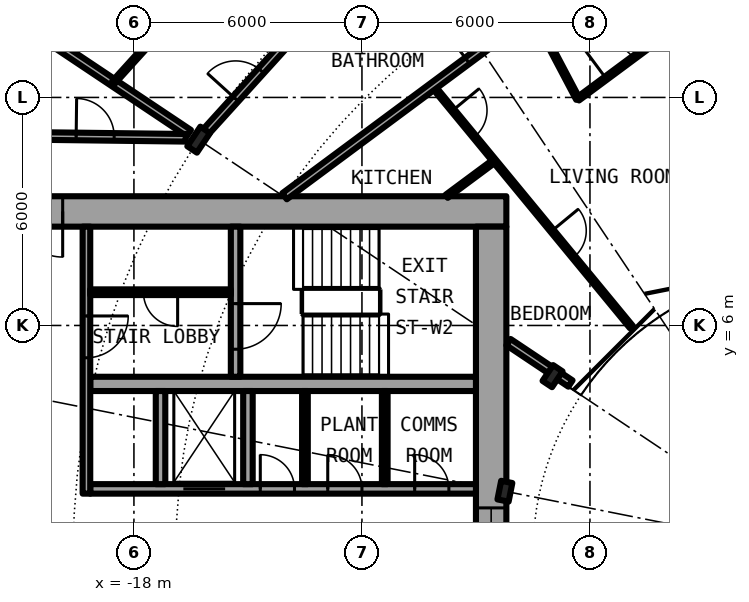
"""IFC4 building model, lengths in metres.
Left out: names, types, materials, properties, quantities, classifications, styles, units other than length and angle.
Written with IfcOpenShell. Run it as: python <this file> out.ifc"""

import sys

from ifc_helpers import new_model, si_unit, direction, frame, frame_2d, origin, origin_2d, place, context, subcontext, project, spatial, rectangle, i_section, extrude, element, fill, save


model = new_model("IFC4")
c1 = context("Model", 3, precision=1e-05, world=origin(), true_north=direction((0.0, 1.0)))
c2 = subcontext(c1, "Body", "Model", "MODEL_VIEW")
j1 = project(units=[si_unit("LENGTHUNIT", "METRE"), si_unit("PLANEANGLEUNIT", "RADIAN")], contexts=[c1])
p1 = place(None, origin())
s1 = spatial("IfcSite", under=j1, at=p1, CompositionType="ELEMENT")
p2 = place(p1, origin())
s2 = spatial("IfcBuilding", under=s1, at=p2, CompositionType="ELEMENT")
p3 = place(p2, frame((0.0, 0.0, 50.25)))
s3 = spatial("IfcBuildingStorey", under=s2, at=p3, CompositionType="ELEMENT", Elevation=50.25)
p4 = place(p3, frame((-16.297, 10.889, 0.0), z_axis=(0.0, 0.0, 1.0), x_axis=(-0.831469612303, 0.55557023302, 0.0)))
e1 = element("IfcColumn", 1, at=p4, inside=s3, PredefinedType="COLUMN", context=c2, shape_type="SweptSolid", body=[
    extrude(i_section(OverallWidth=0.305, OverallDepth=0.62, WebThickness=0.021, FlangeThickness=0.04, FilletRadius=0.027, at=origin_2d()), origin(), (0.0, 0.0, 1.0), 3.05),
])
for number, where, z_axis, x_axis in (
    (2, (-6.984, 4.667, 0.0), (0.0, 0.0, 1.0), (-0.831, 0.556, 0.0)),
    (3, (-8.239, 1.639, 0.0), (0.0, 0.0, 1.0), (-0.981, 0.195, 0.0)),
):
    element("IfcColumn", number, at=place(p3, frame(where, z_axis=z_axis, x_axis=x_axis)), inside=s3, PredefinedType="COLUMN", context=c2, shape_type="SweptSolid", body=[
        extrude(i_section(OverallWidth=0.3, OverallDepth=0.5, WebThickness=0.014, FlangeThickness=0.028, FilletRadius=0.027, at=origin_2d()), origin(), (0.0, 0.0, 1.0), 3.05),
    ])
p5 = place(p3, frame((-8.2, 9.0, 0.0), z_axis=(0.0, 0.0, 1.0), x_axis=(-1.0, 0.0, 0.0)))
e4 = element("IfcWall", 4, at=p5, inside=s3, PredefinedType="SHEAR", context=c2, shape_type="SweptSolid", body=[
    extrude(rectangle(XDim=14.2, YDim=0.8, at=frame_2d((7.1, 0.0))), origin(), (0.0, 0.0, 1.0), 3.05),
])
p6 = place(p5, frame((11.675, 0.0, 0.0)))
e5 = element("IfcOpeningElement", 5, at=p6, cuts=e4, PredefinedType="OPENING", context=c2, shape_type="SweptSolid", body=[
    extrude(rectangle(XDim=1.2, YDim=2.3, at=frame_2d((0.6, 1.15))), frame((0.0, 0.41, 0.0), z_axis=(0.0, -1.0, 0.0), x_axis=(1.0, 0.0, 0.0)), (0.0, 0.0, 1.0), 0.82),
])
p7 = place(p3, frame((-8.6, 8.6, 0.0), z_axis=(0.0, 0.0, 1.0), x_axis=(0.0, -1.0, 0.0)))
e6 = element("IfcWall", 6, at=p7, inside=s3, PredefinedType="SHEAR", context=c2, shape_type="SweptSolid", body=[
    extrude(rectangle(XDim=17.2, YDim=0.8, at=frame_2d((8.6, 0.0))), origin(), (0.0, 0.0, 1.0), 3.05),
])
p8 = place(p7, frame((7.4, 0.0, 0.1)))
e7 = element("IfcOpeningElement", 7, at=p8, cuts=e6, PredefinedType="OPENING", context=c2, shape_type="SweptSolid", body=[
    extrude(rectangle(XDim=2.4, YDim=2.2, at=frame_2d((1.2, 1.1))), frame((0.0, 0.41, 0.0), z_axis=(0.0, -1.0, 0.0), x_axis=(1.0, 0.0, 0.0)), (0.0, 0.0, 1.0), 0.82),
])
p9 = place(p3, frame((-19.15, 1.7, 0.0), z_axis=(0.0, 0.0, 1.0), x_axis=(1.0, 0.0, 0.0)))
e8 = element("IfcWall", 8, at=p9, inside=s3, PredefinedType="SHEAR", context=c2, shape_type="SweptSolid", body=[
    extrude(rectangle(XDim=10.15, YDim=0.25, at=frame_2d((5.075, 0.0))), origin(), (0.0, 0.0, 1.0), 3.05),
])
p10 = place(p9, frame((2.45, 0.0, 0.0)))
e9 = element("IfcOpeningElement", 9, at=p10, cuts=e8, PredefinedType="OPENING", context=c2, shape_type="SweptSolid", body=[
    extrude(rectangle(XDim=1.1, YDim=2.3, at=frame_2d((0.55, 1.15))), frame((0.0, 0.135, 0.0), z_axis=(0.0, -1.0, 0.0), x_axis=(1.0, 0.0, 0.0)), (0.0, 0.0, 1.0), 0.27),
])
p11 = place(p9, frame((8.538, 0.0, 0.0)))
e10 = element("IfcOpeningElement", 10, at=p11, cuts=e8, PredefinedType="OPENING", context=c2, shape_type="SweptSolid", body=[
    extrude(rectangle(XDim=0.9, YDim=2.3, at=frame_2d((0.45, 1.15))), frame((0.0, 0.135, 0.0), z_axis=(0.0, -1.0, 0.0), x_axis=(1.0, 0.0, 0.0)), (0.0, 0.0, 1.0), 0.27),
])
p12 = place(p9, frame((6.25, 0.0, 0.0)))
e11 = element("IfcOpeningElement", 11, at=p12, cuts=e8, PredefinedType="OPENING", context=c2, shape_type="SweptSolid", body=[
    extrude(rectangle(XDim=0.9, YDim=2.3, at=frame_2d((0.45, 1.15))), frame((0.0, 0.135, 0.0), z_axis=(0.0, -1.0, 0.0), x_axis=(1.0, 0.0, 0.0)), (0.0, 0.0, 1.0), 0.27),
])
p13 = place(p9, frame((4.475, 0.0, 0.0)))
e12 = element("IfcOpeningElement", 12, at=p13, cuts=e8, PredefinedType="OPENING", context=c2, shape_type="SweptSolid", body=[
    extrude(rectangle(XDim=0.9, YDim=2.3, at=frame_2d((0.45, 1.15))), frame((0.0, 0.135, 0.0), z_axis=(0.0, -1.0, 0.0), x_axis=(1.0, 0.0, 0.0)), (0.0, 0.0, 1.0), 0.27),
])
p14 = place(p3, frame((-9.0, 4.462, 0.0), z_axis=(0.0, 0.0, 1.0), x_axis=(-1.0, 0.0, 0.0)))
e13 = element("IfcWall", 13, at=p14, inside=s3, PredefinedType="SHEAR", context=c2, shape_type="SweptSolid", body=[
    extrude(rectangle(XDim=10.15, YDim=0.375, at=frame_2d((5.075, 0.0))), origin(), (0.0, 0.0, 1.0), 3.05),
])
p15 = place(p3, frame((-15.325, 8.6, 0.0), z_axis=(0.0, 0.0, 1.0), x_axis=(0.0, -1.0, 0.0)))
e14 = element("IfcWall", 14, at=p15, inside=s3, PredefinedType="SHEAR", context=c2, shape_type="SweptSolid", body=[
    extrude(rectangle(XDim=3.95, YDim=0.25, at=frame_2d((1.975, 0.0))), origin(), (0.0, 0.0, 1.0), 3.05),
])
p16 = place(p15, frame((2.025, 0.0, 0.0)))
e15 = element("IfcOpeningElement", 15, at=p16, cuts=e14, PredefinedType="OPENING", context=c2, shape_type="SweptSolid", body=[
    extrude(rectangle(XDim=1.2, YDim=2.3, at=frame_2d((0.6, 1.15))), frame((0.0, 0.135, 0.0), z_axis=(0.0, -1.0, 0.0), x_axis=(1.0, 0.0, 0.0)), (0.0, 0.0, 1.0), 0.27),
])
for number, where, z_axis, x_axis in (
    (16, (-15.0, 1.825, 0.0), (0.0, 0.0, 1.0), (0.0, 1.0, 0.0)),
    (17, (-17.3, 1.825, 0.0), (0.0, 0.0, 1.0), (0.0, 1.0, 0.0)),
):
    element("IfcWall", number, at=place(p3, frame(where, z_axis=z_axis, x_axis=x_axis)), inside=s3, PredefinedType="SOLIDWALL", context=c2, shape_type="SweptSolid", body=[
        extrude(rectangle(XDim=2.45, YDim=0.25, at=frame_2d((1.225, 0.0))), origin(), (0.0, 0.0, 1.0), 2.7),
    ])
p17 = place(p3, frame((-19.25, 8.6, 0.0), z_axis=(0.0, 0.0, 1.0), x_axis=(0.0, -1.0, 0.0)))
e18 = element("IfcWall", 18, at=p17, inside=s3, PredefinedType="SOLIDWALL", context=c2, shape_type="SweptSolid", body=[
    extrude(rectangle(XDim=7.025, YDim=0.2, at=frame_2d((3.513, 0.0))), origin(), (0.0, 0.0, 1.0), 2.7),
])
p18 = place(p17, frame((2.35, 0.0, 0.0)))
e19 = element("IfcOpeningElement", 19, at=p18, cuts=e18, PredefinedType="OPENING", context=c2, shape_type="SweptSolid", body=[
    extrude(rectangle(XDim=1.1, YDim=2.3, at=frame_2d((0.55, 1.15))), frame((0.0, 0.11, 0.0), z_axis=(0.0, -1.0, 0.0), x_axis=(1.0, 0.0, 0.0)), (0.0, 0.0, 1.0), 0.22),
])
for number, where, z_axis, x_axis in (
    (20, (-11.4, 1.825, 0.0), (0.0, 0.0, 1.0), (0.0, 1.0, 0.0)),
    (21, (-13.5, 1.825, 0.0), (0.0, 0.0, 1.0), (0.0, 1.0, 0.0)),
):
    element("IfcWall", number, at=place(p3, frame(where, z_axis=z_axis, x_axis=x_axis)), inside=s3, PredefinedType="PARTITIONING", context=c2, shape_type="SweptSolid", body=[
        extrude(rectangle(XDim=2.45, YDim=0.15, at=frame_2d((1.225, 0.0))), origin(), (0.0, 0.0, 1.0), 2.7),
    ])
p19 = place(p3, frame((-15.45, 6.875, 0.0), z_axis=(0.0, 0.0, 1.0), x_axis=(-1.0, 0.0, 0.0)))
e22 = element("IfcWall", 22, at=p19, inside=s3, PredefinedType="PARTITIONING", context=c2, shape_type="SweptSolid", body=[
    extrude(rectangle(XDim=3.7, YDim=0.15, at=frame_2d((1.85, 0.0))), origin(), (0.0, 0.0, 1.0), 2.7),
])
p20 = place(p19, frame((1.4, 0.0, 0.0)))
e23 = element("IfcOpeningElement", 23, at=p20, cuts=e22, PredefinedType="OPENING", context=c2, shape_type="SweptSolid", body=[
    extrude(rectangle(XDim=0.9, YDim=2.3, at=frame_2d((0.45, 1.15))), frame((0.0, 0.085, 0.0), z_axis=(0.0, -1.0, 0.0), x_axis=(1.0, 0.0, 0.0)), (0.0, 0.0, 1.0), 0.17),
])
p21 = place(p3, frame((-22.596, 15.097, 0.0), z_axis=(0.0, 0.0, 1.0), x_axis=(0.831507055747, -0.555514190857, 0.0)))
e24 = element("IfcWall", 24, at=p21, inside=s3, PredefinedType="PARTITIONING", context=c2, shape_type="SweptSolid", body=[
    extrude(rectangle(XDim=7.265, YDim=0.2, at=frame_2d((3.633, 0.0))), origin(), (0.0, 0.0, 1.0), 2.7),
])
p22 = place(p3, frame((-10.132, 12.296, 0.0), z_axis=(0.0, 0.0, 1.0), x_axis=(0.635976043025, -0.771708800454, 0.0)))
e25 = element("IfcWall", 25, at=p22, inside=s3, PredefinedType="PARTITIONING", context=c2, shape_type="SweptSolid", body=[
    extrude(rectangle(XDim=8.213, YDim=0.1, at=frame_2d((4.106, 0.0))), origin(), (0.0, 0.0, 1.0), 2.7),
])
p23 = place(p22, frame((0.823, 0.0, 0.0)))
e26 = element("IfcOpeningElement", 26, at=p23, cuts=e25, PredefinedType="OPENING", context=c2, shape_type="SweptSolid", body=[
    extrude(rectangle(XDim=0.9, YDim=2.3, at=frame_2d((0.45, 1.15))), frame((0.0, 0.06, 0.0), z_axis=(0.0, -1.0, 0.0), x_axis=(1.0, 0.0, 0.0)), (0.0, 0.0, 1.0), 0.12),
])
p24 = place(p22, frame((4.929, 0.0, 0.0)))
e27 = element("IfcOpeningElement", 27, at=p24, cuts=e25, PredefinedType="OPENING", context=c2, shape_type="SweptSolid", body=[
    extrude(rectangle(XDim=0.9, YDim=2.3, at=frame_2d((0.45, 1.15))), frame((0.0, 0.06, 0.0), z_axis=(0.0, -1.0, 0.0), x_axis=(1.0, 0.0, 0.0)), (0.0, 0.0, 1.0), 0.12),
])
p25 = place(p3, frame((-7.519, 14.234, 0.0), z_axis=(0.0, 0.0, 1.0), x_axis=(0.467001992543, -0.884256263173, 0.0)))
e28 = element("IfcWall", 28, at=p25, inside=s3, PredefinedType="PARTITIONING", context=c2, shape_type="SweptSolid", body=[
    extrude(rectangle(XDim=2.572, YDim=0.1, at=frame_2d((1.286, 0.0))), origin(), (0.0, 0.0, 1.0), 2.7),
])
p26 = place(p3, frame((-6.513, 4.472, 0.0), z_axis=(0.0, 0.0, 1.0), x_axis=(-0.831417956244, 0.555647533996, 0.0)))
e29 = element("IfcWall", 29, at=p26, inside=s3, PredefinedType="PARTITIONING", context=c2, shape_type="SweptSolid", body=[
    extrude(rectangle(XDim=1.962, YDim=0.2, at=frame_2d((0.981, 0.0))), origin(), (0.0, 0.0, 1.0), 2.7),
])
p27 = place(p3, frame((-21.675, 11.0, 0.0), z_axis=(0.0, 0.0, 1.0), x_axis=(0.99992425795, -0.012307654658, 0.0)))
e30 = element("IfcWall", 30, at=p27, inside=s3, PredefinedType="PARTITIONING", context=c2, shape_type="SweptSolid", body=[
    extrude(rectangle(XDim=5.039, YDim=0.2, at=frame_2d((2.519, 0.0))), origin(), (0.0, 0.0, 1.0), 2.7),
])
p28 = place(p27, frame((2.155, 0.0, 0.0)))
e31 = element("IfcOpeningElement", 31, at=p28, cuts=e30, PredefinedType="OPENING", context=c2, shape_type="SweptSolid", body=[
    extrude(rectangle(XDim=1.0, YDim=2.3, at=frame_2d((0.5, 1.15))), frame((0.0, 0.11, 0.0), z_axis=(0.0, -1.0, 0.0), x_axis=(1.0, 0.0, 0.0)), (0.0, 0.0, 1.0), 0.22),
])
p29 = place(p3, frame((-9.772, 9.398, 0.0), z_axis=(0.0, 0.0, 1.0), x_axis=(0.803264156882, 0.595622946392, 0.0)))
e32 = element("IfcWall", 32, at=p29, inside=s3, PredefinedType="PARTITIONING", context=c2, shape_type="SweptSolid", body=[
    extrude(rectangle(XDim=1.565, YDim=0.1, at=frame_2d((0.782, 0.0))), origin(), (0.0, 0.0, 1.0), 2.7),
])
p30 = place(p3, frame((-6.318, 11.96, 0.0), z_axis=(0.0, 0.0, 1.0), x_axis=(0.803128348509, 0.595806055542, 0.0)))
e33 = element("IfcWall", 33, at=p30, inside=s3, PredefinedType="PARTITIONING", context=c2, shape_type="SweptSolid", body=[
    extrude(rectangle(XDim=2.734, YDim=0.1, at=frame_2d((1.367, 0.0))), origin(), (0.0, 0.0, 1.0), 2.7),
])
p31 = place(p30, frame((0.917, 0.0, 0.0)))
e34 = element("IfcOpeningElement", 34, at=p31, cuts=e33, PredefinedType="OPENING", context=c2, shape_type="SweptSolid", body=[
    extrude(rectangle(XDim=0.9, YDim=2.3, at=frame_2d((0.45, 1.15))), frame((0.0, 0.06, 0.0), z_axis=(0.0, -1.0, 0.0), x_axis=(1.0, 0.0, 0.0)), (0.0, 0.0, 1.0), 0.12),
])
p32 = place(p3, frame((-14.037, 9.4, 0.0), z_axis=(0.0, 0.0, 1.0), x_axis=(0.803202106898, 0.595706618626, 0.0)))
e35 = element("IfcWall", 35, at=p32, inside=s3, PredefinedType="PARTITIONING", context=c2, shape_type="SweptSolid", body=[
    extrude(rectangle(XDim=11.368, YDim=0.2, at=frame_2d((5.684, 0.0))), origin(), (0.0, 0.0, 1.0), 2.7),
])
p33 = place(p32, frame((5.988, 0.0, 0.0)))
e36 = element("IfcOpeningElement", 36, at=p33, cuts=e35, PredefinedType="OPENING", context=c2, shape_type="SweptSolid", body=[
    extrude(rectangle(XDim=1.0, YDim=2.3, at=frame_2d((0.5, 1.15))), frame((0.0, 0.11, 0.0), z_axis=(0.0, -1.0, 0.0), x_axis=(1.0, 0.0, 0.0)), (0.0, 0.0, 1.0), 0.22),
])
p34 = place(p3, frame((-16.193, 11.003, 0.0), z_axis=(0.0, 0.0, 1.0), x_axis=(0.671514934772, 0.740991020444, 0.0)))
e37 = element("IfcWall", 37, at=p34, inside=s3, PredefinedType="PARTITIONING", context=c2, shape_type="SweptSolid", body=[
    extrude(rectangle(XDim=5.598, YDim=0.2, at=frame_2d((2.799, 0.0))), origin(), (0.0, 0.0, 1.0), 2.38),
])
p35 = place(p34, frame((1.293, 0.0, 0.0)))
e38 = element("IfcOpeningElement", 38, at=p35, cuts=e37, PredefinedType="OPENING", context=c2, shape_type="SweptSolid", body=[
    extrude(rectangle(XDim=1.0, YDim=2.3, at=frame_2d((0.5, 1.15))), frame((0.0, 0.11, 0.0), z_axis=(0.0, -1.0, 0.0), x_axis=(1.0, 0.0, 0.0)), (0.0, 0.0, 1.0), 0.22),
])
p36 = place(p3, frame((-18.538, 12.394, 0.0), z_axis=(0.0, 0.0, 1.0), x_axis=(0.67169789574, 0.740825172937, 0.0)))
e39 = element("IfcWall", 39, at=p36, inside=s3, PredefinedType="PARTITIONING", context=c2, shape_type="SweptSolid", body=[
    extrude(rectangle(XDim=2.183, YDim=0.1, at=frame_2d((1.091, 0.0))), origin(), (0.0, 0.0, 1.0), 2.7),
])
p37 = place(p10, origin())
e40 = element("IfcDoor", 40, at=p37, inside=s3, OperationType="DOUBLE_DOOR_SLIDING", PredefinedType="DOOR", context=c2, shape_type="SweptSolid", body=[
    extrude(rectangle(XDim=1.1, YDim=2.3, at=frame_2d((0.55, 1.15))), frame((0.0, 0.025, 0.0), z_axis=(0.0, -1.0, 0.0), x_axis=(1.0, 0.0, 0.0)), (0.0, 0.0, 1.0), 0.05),
])
fill(e9, e40)
p38 = place(p11, origin())
e41 = element("IfcDoor", 41, at=p38, inside=s3, OperationType="SINGLE_SWING_LEFT", PredefinedType="DOOR", context=c2, shape_type="SweptSolid", body=[
    extrude(rectangle(XDim=0.9, YDim=2.3, at=frame_2d((0.45, 1.15))), frame((0.0, 0.025, 0.0), z_axis=(0.0, -1.0, 0.0), x_axis=(1.0, 0.0, 0.0)), (0.0, 0.0, 1.0), 0.05),
])
fill(e10, e41)
p39 = place(p12, origin())
e42 = element("IfcDoor", 42, at=p39, inside=s3, OperationType="SINGLE_SWING_LEFT", PredefinedType="DOOR", context=c2, shape_type="SweptSolid", body=[
    extrude(rectangle(XDim=0.9, YDim=2.3, at=frame_2d((0.45, 1.15))), frame((0.0, 0.025, 0.0), z_axis=(0.0, -1.0, 0.0), x_axis=(1.0, 0.0, 0.0)), (0.0, 0.0, 1.0), 0.05),
])
fill(e11, e42)
p40 = place(p13, origin())
e43 = element("IfcDoor", 43, at=p40, inside=s3, OperationType="SINGLE_SWING_RIGHT", PredefinedType="DOOR", context=c2, shape_type="SweptSolid", body=[
    extrude(rectangle(XDim=0.9, YDim=2.3, at=frame_2d((0.45, 1.15))), frame((0.0, 0.025, 0.0), z_axis=(0.0, -1.0, 0.0), x_axis=(1.0, 0.0, 0.0)), (0.0, 0.0, 1.0), 0.05),
])
fill(e12, e43)
p41 = place(p20, origin())
e44 = element("IfcDoor", 44, at=p41, inside=s3, OperationType="SINGLE_SWING_LEFT", PredefinedType="DOOR", context=c2, shape_type="SweptSolid", body=[
    extrude(rectangle(XDim=0.9, YDim=2.3, at=frame_2d((0.45, 1.15))), frame((0.0, 0.025, 0.0), z_axis=(0.0, -1.0, 0.0), x_axis=(1.0, 0.0, 0.0)), (0.0, 0.0, 1.0), 0.05),
])
fill(e23, e44)
p42 = place(p16, origin())
e45 = element("IfcDoor", 45, at=p42, inside=s3, OperationType="SINGLE_SWING_LEFT", PredefinedType="DOOR", context=c2, shape_type="SweptSolid", body=[
    extrude(rectangle(XDim=1.2, YDim=2.3, at=frame_2d((0.6, 1.15))), frame((0.0, 0.025, 0.0), z_axis=(0.0, -1.0, 0.0), x_axis=(1.0, 0.0, 0.0)), (0.0, 0.0, 1.0), 0.05),
])
fill(e15, e45)
p43 = place(p18, origin())
e46 = element("IfcDoor", 46, at=p43, inside=s3, OperationType="SINGLE_SWING_RIGHT", PredefinedType="DOOR", context=c2, shape_type="SweptSolid", body=[
    extrude(rectangle(XDim=1.1, YDim=2.3, at=frame_2d((0.55, 1.15))), frame((0.0, 0.025, 0.0), z_axis=(0.0, -1.0, 0.0), x_axis=(1.0, 0.0, 0.0)), (0.0, 0.0, 1.0), 0.05),
])
fill(e19, e46)
p44 = place(p6, origin())
e47 = element("IfcDoor", 47, at=p44, inside=s3, OperationType="SINGLE_SWING_LEFT", PredefinedType="DOOR", context=c2, shape_type="SweptSolid", body=[
    extrude(rectangle(XDim=1.2, YDim=2.3, at=frame_2d((0.6, 1.15))), frame((0.0, 0.025, 0.0), z_axis=(0.0, -1.0, 0.0), x_axis=(1.0, 0.0, 0.0)), (0.0, 0.0, 1.0), 0.05),
])
fill(e5, e47)
p45 = place(p8, origin())
e48 = element("IfcWindow", 48, at=p45, inside=s3, PartitioningType="SINGLE_PANEL", PredefinedType="WINDOW", context=c2, shape_type="SweptSolid", body=[
    extrude(rectangle(XDim=2.4, YDim=2.2, at=frame_2d((1.2, 1.1))), frame((0.0, 0.03, 0.0), z_axis=(0.0, -1.0, 0.0), x_axis=(1.0, 0.0, 0.0)), (0.0, 0.0, 1.0), 0.06),
])
fill(e7, e48)
p46 = place(p35, origin())
e49 = element("IfcDoor", 49, at=p46, inside=s3, OperationType="SINGLE_SWING_LEFT", PredefinedType="DOOR", context=c2, shape_type="SweptSolid", body=[
    extrude(rectangle(XDim=1.0, YDim=2.3, at=frame_2d((0.5, 1.15))), frame((0.0, 0.025, 0.0), z_axis=(0.0, -1.0, 0.0), x_axis=(1.0, 0.0, 0.0)), (0.0, 0.0, 1.0), 0.05),
])
fill(e38, e49)
p47 = place(p33, origin())
e50 = element("IfcDoor", 50, at=p47, inside=s3, OperationType="SINGLE_SWING_RIGHT", PredefinedType="DOOR", context=c2, shape_type="SweptSolid", body=[
    extrude(rectangle(XDim=1.0, YDim=2.3, at=frame_2d((0.5, 1.15))), frame((0.0, 0.025, 0.0), z_axis=(0.0, -1.0, 0.0), x_axis=(1.0, 0.0, 0.0)), (0.0, 0.0, 1.0), 0.05),
])
fill(e36, e50)
p48 = place(p31, origin())
e51 = element("IfcDoor", 51, at=p48, inside=s3, OperationType="SINGLE_SWING_RIGHT", PredefinedType="DOOR", context=c2, shape_type="SweptSolid", body=[
    extrude(rectangle(XDim=0.9, YDim=2.3, at=frame_2d((0.45, 1.15))), frame((0.0, 0.025, 0.0), z_axis=(0.0, -1.0, 0.0), x_axis=(1.0, 0.0, 0.0)), (0.0, 0.0, 1.0), 0.05),
])
fill(e34, e51)
p49 = place(p23, origin())
e52 = element("IfcDoor", 52, at=p49, inside=s3, OperationType="SINGLE_SWING_LEFT", PredefinedType="DOOR", context=c2, shape_type="SweptSolid", body=[
    extrude(rectangle(XDim=0.9, YDim=2.3, at=frame_2d((0.45, 1.15))), frame((0.0, 0.025, 0.0), z_axis=(0.0, -1.0, 0.0), x_axis=(1.0, 0.0, 0.0)), (0.0, 0.0, 1.0), 0.05),
])
fill(e26, e52)
p50 = place(p24, origin())
e53 = element("IfcDoor", 53, at=p50, inside=s3, OperationType="SINGLE_SWING_RIGHT", PredefinedType="DOOR", context=c2, shape_type="SweptSolid", body=[
    extrude(rectangle(XDim=0.9, YDim=2.3, at=frame_2d((0.45, 1.15))), frame((0.0, 0.025, 0.0), z_axis=(0.0, -1.0, 0.0), x_axis=(1.0, 0.0, 0.0)), (0.0, 0.0, 1.0), 0.05),
])
fill(e27, e53)
p51 = place(p28, origin())
e54 = element("IfcDoor", 54, at=p51, inside=s3, OperationType="SINGLE_SWING_RIGHT", PredefinedType="DOOR", context=c2, shape_type="SweptSolid", body=[
    extrude(rectangle(XDim=1.0, YDim=2.3, at=frame_2d((0.5, 1.15))), frame((0.0, 0.025, 0.0), z_axis=(0.0, -1.0, 0.0), x_axis=(1.0, 0.0, 0.0)), (0.0, 0.0, 1.0), 0.05),
])
fill(e31, e54)
save(model, sys.argv[1])
